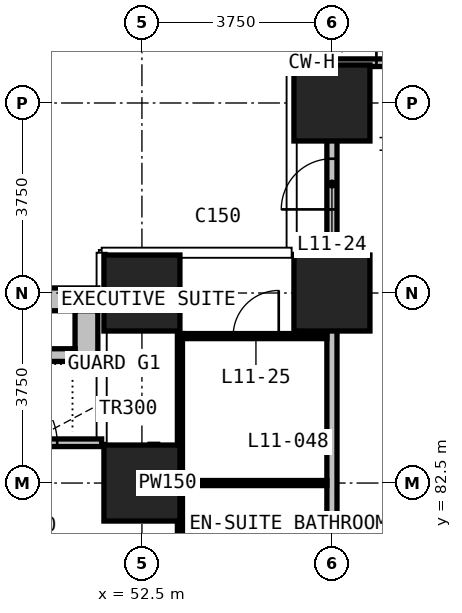
"""IFC4 building model, lengths in metres.
Left out: names, types, materials, properties, quantities, classifications, styles, units other than length and angle.
Written with IfcOpenShell. Run it as: python <this file> out.ifc"""

import sys

from ifc_helpers import new_model, si_unit, direction, frame, frame_2d, origin, origin_2d, place, context, subcontext, project, spatial, rectangle, extrude, element, fill, save


model = new_model("IFC4")
c1 = context("Model", 3, precision=1e-05, world=origin(), true_north=direction((0.0, 1.0)))
c2 = subcontext(c1, "Body", "Model", "MODEL_VIEW")
j1 = project(units=[si_unit("LENGTHUNIT", "METRE"), si_unit("PLANEANGLEUNIT", "RADIAN")], contexts=[c1])
p1 = place(None, origin())
s1 = spatial("IfcSite", under=j1, at=p1, CompositionType="ELEMENT")
p2 = place(p1, origin())
s2 = spatial("IfcBuilding", under=s1, at=p2, CompositionType="ELEMENT")
p3 = place(p2, frame((0.0, 0.0, 56.0)))
s3 = spatial("IfcBuildingStorey", under=s2, at=p3, CompositionType="ELEMENT", Elevation=56.0)
for number, where, z_axis, x_axis in (
    (1, (52.5, 82.5, 0.0), (0.0, 0.0, 1.0), (1.0, 0.0, 0.0)),
    (2, (52.5, 86.25, 0.0), (0.0, 0.0, 1.0), (1.0, 0.0, 0.0)),
    (3, (56.25, 86.25, 0.0), (0.0, 0.0, 1.0), (1.0, 0.0, 0.0)),
    (4, (56.25, 90.0, 0.0), (0.0, 0.0, 1.0), (1.0, 0.0, 0.0)),
):
    element("IfcColumn", number, at=place(p3, frame(where, z_axis=z_axis, x_axis=x_axis)), inside=s3, PredefinedType="COLUMN", context=c2, shape_type="SweptSolid", body=[
        extrude(rectangle(XDim=1.5, YDim=1.5, at=origin_2d()), origin(), (0.0, 0.0, 1.0), 3.3),
    ])
p4 = place(p3, frame((56.25, 90.795, 0.0), z_axis=(0.0, 0.0, 1.0), x_axis=(1.0, 0.0, 0.0)))
e5 = element("IfcWall", 5, at=p4, inside=s3, PredefinedType="SOLIDWALL", context=c2, shape_type="SweptSolid", body=[
    extrude(rectangle(XDim=2.955, YDim=0.15, at=frame_2d((1.478, 0.0))), origin(), (0.0, 0.0, 1.0), 3.0),
])
p5 = place(p4, frame((0.877, 0.0, 0.0)))
e6 = element("IfcOpeningElement", 6, at=p5, cuts=e5, PredefinedType="OPENING", context=c2, shape_type="SweptSolid", body=[
    extrude(rectangle(XDim=1.2, YDim=2.4, at=frame_2d((0.6, 1.2))), frame((0.0, 0.085, 0.0), z_axis=(0.0, -1.0, 0.0), x_axis=(1.0, 0.0, 0.0)), (0.0, 0.0, 1.0), 0.17),
])
p6 = place(p3, frame((48.75, 83.295, 0.0), z_axis=(0.0, 0.0, 1.0), x_axis=(1.0, 0.0, 0.0)))
e7 = element("IfcWall", 7, at=p6, inside=s3, PredefinedType="SOLIDWALL", context=c2, shape_type="SweptSolid", body=[
    extrude(rectangle(XDim=2.955, YDim=0.15, at=frame_2d((1.478, 0.0))), origin(), (0.0, 0.0, 1.0), 3.0),
])
p7 = place(p6, frame((0.877, 0.0, 0.0)))
e8 = element("IfcOpeningElement", 8, at=p7, cuts=e7, PredefinedType="OPENING", context=c2, shape_type="SweptSolid", body=[
    extrude(rectangle(XDim=1.2, YDim=2.0, at=frame_2d((0.6, 1.0))), frame((0.0, 0.085, 0.0), z_axis=(0.0, -1.0, 0.0), x_axis=(1.0, 0.0, 0.0)), (0.0, 0.0, 1.0), 0.17),
])
p8 = place(p3, frame((48.45, 86.125, 0.0), z_axis=(0.0, 0.0, 1.0), x_axis=(1.0, 0.0, 0.0)))
e9 = element("IfcWall", 9, at=p8, inside=s3, PredefinedType="USERDEFINED", context=c2, shape_type="SweptSolid", body=[
    extrude(rectangle(XDim=3.18, YDim=0.45, at=frame_2d((1.59, 0.0))), origin(), (0.0, 0.0, 1.0), 1.1),
])
p9 = place(p3, frame((51.405, 84.9, 0.0), z_axis=(0.0, 0.0, 1.0), x_axis=(0.0, 1.0, 0.0)))
e10 = element("IfcWall", 10, at=p9, inside=s3, PredefinedType="USERDEFINED", context=c2, shape_type="SweptSolid", body=[
    extrude(rectangle(XDim=1.0, YDim=0.45, at=frame_2d((0.5, 0.0))), origin(), (0.0, 0.0, 1.0), 1.1),
])
p10 = place(p3, frame((48.9, 85.025, 0.0), z_axis=(0.0, 0.0, 1.0), x_axis=(1.0, 0.0, 0.0)))
e11 = element("IfcWall", 11, at=p10, inside=s3, PredefinedType="USERDEFINED", context=c2, shape_type="SweptSolid", body=[
    extrude(rectangle(XDim=2.28, YDim=0.25, at=frame_2d((1.14, 0.0))), origin(), (0.0, 0.0, 1.0), 1.0),
])
p11 = place(p3, frame((56.25, 52.4, 0.0), z_axis=(0.0, 0.0, 1.0), x_axis=(0.0, 1.0, 0.0)))
e12 = element("IfcWall", 12, at=p11, inside=s3, PredefinedType="PARTITIONING", context=c2, shape_type="SweptSolid", body=[
    extrude(rectangle(XDim=37.675, YDim=0.2, at=frame_2d((18.837, 0.0))), origin(), (0.0, 0.0, 1.0), 3.0),
])
p12 = place(p11, frame((5.5, 0.0, 0.0)))
e13 = element("IfcOpeningElement", 13, at=p12, cuts=e12, PredefinedType="OPENING", context=c2, shape_type="SweptSolid", body=[
    extrude(rectangle(XDim=1.0, YDim=2.2, at=frame_2d((0.5, 1.1))), frame((0.0, 0.11, 0.0), z_axis=(0.0, -1.0, 0.0), x_axis=(1.0, 0.0, 0.0)), (0.0, 0.0, 1.0), 0.22),
])
p13 = place(p11, frame((8.7, 0.0, 0.0)))
e14 = element("IfcOpeningElement", 14, at=p13, cuts=e12, PredefinedType="OPENING", context=c2, shape_type="SweptSolid", body=[
    extrude(rectangle(XDim=1.0, YDim=2.2, at=frame_2d((0.5, 1.1))), frame((0.0, 0.11, 0.0), z_axis=(0.0, -1.0, 0.0), x_axis=(1.0, 0.0, 0.0)), (0.0, 0.0, 1.0), 0.22),
])
p14 = place(p11, frame((20.5, 0.0, 0.0)))
e15 = element("IfcOpeningElement", 15, at=p14, cuts=e12, PredefinedType="OPENING", context=c2, shape_type="SweptSolid", body=[
    extrude(rectangle(XDim=1.0, YDim=2.2, at=frame_2d((0.5, 1.1))), frame((0.0, 0.11, 0.0), z_axis=(0.0, -1.0, 0.0), x_axis=(1.0, 0.0, 0.0)), (0.0, 0.0, 1.0), 0.22),
])
p15 = place(p11, frame((23.7, 0.0, 0.0)))
e16 = element("IfcOpeningElement", 16, at=p15, cuts=e12, PredefinedType="OPENING", context=c2, shape_type="SweptSolid", body=[
    extrude(rectangle(XDim=1.0, YDim=2.2, at=frame_2d((0.5, 1.1))), frame((0.0, 0.11, 0.0), z_axis=(0.0, -1.0, 0.0), x_axis=(1.0, 0.0, 0.0)), (0.0, 0.0, 1.0), 0.22),
])
p16 = place(p11, frame((35.5, 0.0, 0.0)))
e17 = element("IfcOpeningElement", 17, at=p16, cuts=e12, PredefinedType="OPENING", context=c2, shape_type="SweptSolid", body=[
    extrude(rectangle(XDim=1.0, YDim=2.2, at=frame_2d((0.5, 1.1))), frame((0.0, 0.11, 0.0), z_axis=(0.0, -1.0, 0.0), x_axis=(1.0, 0.0, 0.0)), (0.0, 0.0, 1.0), 0.22),
])
p17 = place(p3, frame((56.25, 90.03, 0.0), z_axis=(0.0, 0.0, 1.0), x_axis=(0.0, 1.0, 0.0)))
e18 = element("IfcWall", 18, at=p17, inside=s3, PredefinedType="PARTITIONING", context=c2, shape_type="SweptSolid", body=[
    extrude(rectangle(XDim=0.615, YDim=0.2, at=frame_2d((0.308, 0.0))), origin(), (0.0, 0.0, 1.0), 3.0),
])
p18 = place(p3, frame((52.81, 82.5, 0.0), z_axis=(0.0, 0.0, 1.0), x_axis=(1.0, 0.0, 0.0)))
e19 = element("IfcWall", 19, at=p18, inside=s3, PredefinedType="PARTITIONING", context=c2, shape_type="SweptSolid", body=[
    extrude(rectangle(XDim=0.39, YDim=0.15, at=frame_2d((0.195, 0.0))), origin(), (0.0, 0.0, 1.0), 3.0),
])
p19 = place(p3, frame((55.605, 90.0, 0.0), z_axis=(0.0, 0.0, 1.0), x_axis=(1.0, 0.0, 0.0)))
e20 = element("IfcWall", 20, at=p19, inside=s3, PredefinedType="PARTITIONING", context=c2, shape_type="SweptSolid", body=[
    extrude(rectangle(XDim=0.545, YDim=0.15, at=frame_2d((0.272, 0.0))), origin(), (0.0, 0.0, 1.0), 3.0),
])
p20 = place(p3, frame((52.735, 82.425, 0.0), z_axis=(0.0, 0.0, 1.0), x_axis=(0.0, 1.0, 0.0)))
e21 = element("IfcWall", 21, at=p20, inside=s3, PredefinedType="PARTITIONING", context=c2, shape_type="SweptSolid", body=[
    extrude(rectangle(XDim=0.84, YDim=0.15, at=frame_2d((0.42, 0.0))), origin(), (0.0, 0.0, 1.0), 3.0),
])
p21 = place(p3, frame((53.3, 82.5, 0.0), z_axis=(0.0, 0.0, 1.0), x_axis=(1.0, 0.0, 0.0)))
e22 = element("IfcWall", 22, at=p21, inside=s3, PredefinedType="PARTITIONING", context=c2, shape_type="SweptSolid", body=[
    extrude(rectangle(XDim=2.85, YDim=0.1, at=frame_2d((1.425, 0.0))), origin(), (0.0, 0.0, 1.0), 3.0),
])
p22 = place(p3, frame((53.3, 85.4, 0.0), z_axis=(0.0, 0.0, 1.0), x_axis=(1.0, 0.0, 0.0)))
e23 = element("IfcWall", 23, at=p22, inside=s3, PredefinedType="PARTITIONING", context=c2, shape_type="SweptSolid", body=[
    extrude(rectangle(XDim=2.85, YDim=0.1, at=frame_2d((1.425, 0.0))), origin(), (0.0, 0.0, 1.0), 3.0),
])
p23 = place(p22, frame((1.0, 0.0, 0.0)))
e24 = element("IfcOpeningElement", 24, at=p23, cuts=e23, PredefinedType="OPENING", context=c2, shape_type="SweptSolid", body=[
    extrude(rectangle(XDim=0.9, YDim=2.2, at=frame_2d((0.45, 1.1))), frame((0.0, 0.06, 0.0), z_axis=(0.0, -1.0, 0.0), x_axis=(1.0, 0.0, 0.0)), (0.0, 0.0, 1.0), 0.12),
])
p24 = place(p3, frame((53.25, 79.55, 0.0), z_axis=(0.0, 0.0, 1.0), x_axis=(0.0, 1.0, 0.0)))
e25 = element("IfcWall", 25, at=p24, inside=s3, PredefinedType="PARTITIONING", context=c2, shape_type="SweptSolid", body=[
    extrude(rectangle(XDim=5.9, YDim=0.1, at=frame_2d((2.95, 0.0))), origin(), (0.0, 0.0, 1.0), 3.0),
])
p25 = place(p5, origin())
e26 = element("IfcDoor", 26, at=p25, inside=s3, OperationType="SINGLE_SWING_LEFT", PredefinedType="DOOR", context=c2, shape_type="SweptSolid", body=[
    extrude(rectangle(XDim=1.2, YDim=2.4, at=frame_2d((0.6, 1.2))), frame((0.0, 0.025, 0.0), z_axis=(0.0, -1.0, 0.0), x_axis=(1.0, 0.0, 0.0)), (0.0, 0.0, 1.0), 0.05),
])
fill(e6, e26)
p26 = place(p7, origin())
e27 = element("IfcDoor", 27, at=p26, inside=s3, OperationType="SINGLE_SWING_LEFT", PredefinedType="DOOR", context=c2, shape_type="SweptSolid", body=[
    extrude(rectangle(XDim=1.2, YDim=2.0, at=frame_2d((0.6, 1.0))), frame((0.0, 0.025, 0.0), z_axis=(0.0, -1.0, 0.0), x_axis=(1.0, 0.0, 0.0)), (0.0, 0.0, 1.0), 0.05),
])
fill(e8, e27)
p27 = place(p16, origin())
e28 = element("IfcDoor", 28, at=p27, inside=s3, OperationType="SINGLE_SWING_LEFT", PredefinedType="DOOR", context=c2, shape_type="SweptSolid", body=[
    extrude(rectangle(XDim=1.0, YDim=2.2, at=frame_2d((0.5, 1.1))), frame((0.0, 0.025, 0.0), z_axis=(0.0, -1.0, 0.0), x_axis=(1.0, 0.0, 0.0)), (0.0, 0.0, 1.0), 0.05),
])
fill(e17, e28)
p28 = place(p23, origin())
e29 = element("IfcDoor", 29, at=p28, inside=s3, OperationType="SINGLE_SWING_RIGHT", PredefinedType="DOOR", context=c2, shape_type="SweptSolid", body=[
    extrude(rectangle(XDim=0.9, YDim=2.2, at=frame_2d((0.45, 1.1))), frame((0.0, 0.025, 0.0), z_axis=(0.0, -1.0, 0.0), x_axis=(1.0, 0.0, 0.0)), (0.0, 0.0, 1.0), 0.05),
])
fill(e24, e29)
save(model, sys.argv[1])
